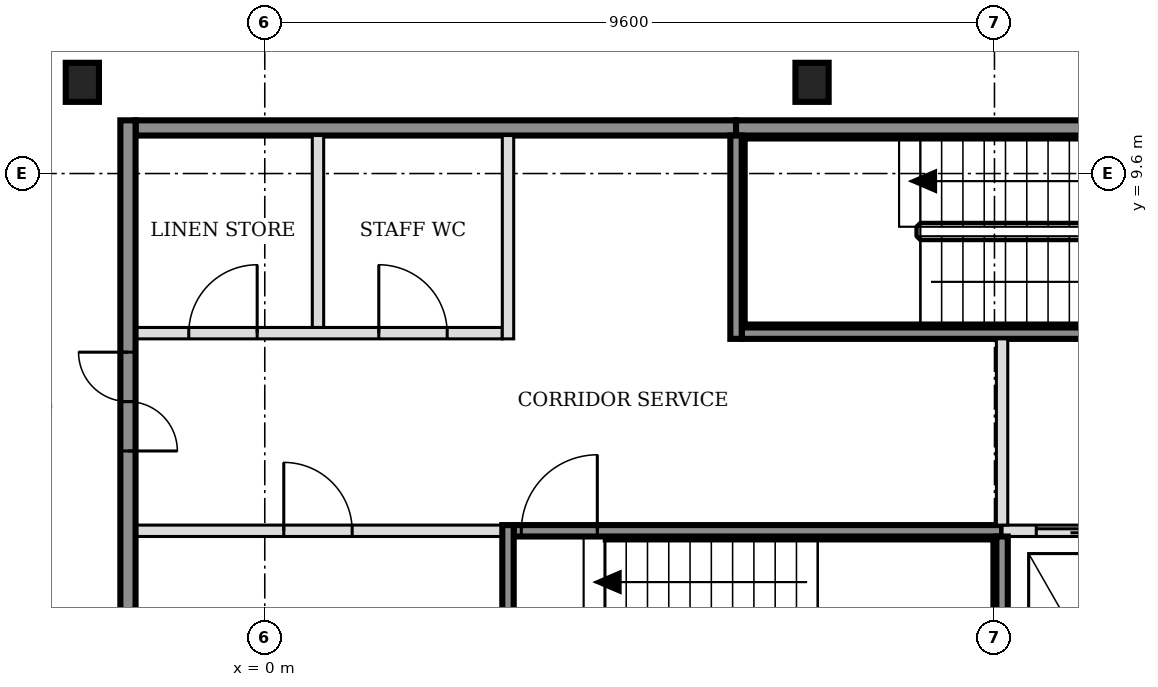
"""IFC4 building model, lengths in metres.
Left out: names, types, materials, properties, quantities, classifications, styles, units other than length and angle.
Written with IfcOpenShell. Run it as: python <this file> out.ifc"""

import sys

from ifc_helpers import new_model, si_unit, direction, frame, frame_2d, origin, origin_2d, place, context, subcontext, project, spatial, rectangle, i_section, extrude, element, fill, save


model = new_model("IFC4")
c1 = context("Model", 3, precision=1e-05, world=origin(), true_north=direction((0.0, 1.0)))
c2 = subcontext(c1, "Body", "Model", "MODEL_VIEW")
j1 = project(units=[si_unit("LENGTHUNIT", "METRE"), si_unit("PLANEANGLEUNIT", "RADIAN")], contexts=[c1])
p1 = place(None, origin())
s1 = spatial("IfcSite", under=j1, at=p1, CompositionType="ELEMENT")
p2 = place(p1, origin())
s2 = spatial("IfcBuilding", under=s1, at=p2, CompositionType="ELEMENT")
p3 = place(p2, frame((0.0, 0.0, 101.4)))
s3 = spatial("IfcBuildingStorey", under=s2, at=p3, CompositionType="ELEMENT", Elevation=101.4)
for number, where, z_axis, x_axis in (
    (1, (-2.4, 10.8, -0.15), (0.0, 0.0, 1.0), (1.0, 0.0, 0.0)),
    (2, (7.2, 10.8, -0.15), (0.0, 0.0, 1.0), (1.0, 0.0, 0.0)),
):
    element("IfcColumn", number, at=place(p3, frame(where, z_axis=z_axis, x_axis=x_axis)), inside=s3, PredefinedType="COLUMN", context=c2, shape_type="SweptSolid", body=[
        extrude(i_section(OverallWidth=0.437, OverallDepth=0.514, WebThickness=0.061, FlangeThickness=0.097, FilletRadius=0.015, at=origin_2d()), origin(), (0.0, 0.0, 1.0), 3.6),
    ])
p4 = place(p3, frame((-1.7, 4.9, 0.0), z_axis=(0.0, 0.0, 1.0), x_axis=(1.0, 0.0, 0.0)))
e3 = element("IfcWall", 3, at=p4, inside=s3, PredefinedType="PARTITIONING", context=c2, shape_type="SweptSolid", body=[
    extrude(rectangle(XDim=4.825, YDim=0.15, at=frame_2d((2.413, 0.0))), origin(), (0.0, 0.0, 1.0), 3.45),
])
p5 = place(p4, frame((1.95, 0.0, 0.0)))
e4 = element("IfcOpeningElement", 4, at=p5, cuts=e3, PredefinedType="OPENING", context=c2, shape_type="SweptSolid", body=[
    extrude(rectangle(XDim=0.9, YDim=2.1, at=frame_2d((0.45, 1.05))), frame((0.0, 0.085, 0.0), z_axis=(0.0, -1.0, 0.0), x_axis=(1.0, 0.0, 0.0)), (0.0, 0.0, 1.0), 0.17),
])
p6 = place(p3, frame((3.275, 4.9, 0.0), z_axis=(0.0, 0.0, 1.0), x_axis=(1.0, 0.0, 0.0)))
e5 = element("IfcWall", 5, at=p6, inside=s3, PredefinedType="SOLIDWALL", context=c2, shape_type="SweptSolid", body=[
    extrude(rectangle(XDim=6.425, YDim=0.15, at=frame_2d((3.212, 0.0))), origin(), (0.0, 0.0, 1.0), 3.45),
])
p7 = place(p6, frame((0.1, 0.0, 0.0)))
e6 = element("IfcOpeningElement", 6, at=p7, cuts=e5, PredefinedType="OPENING", context=c2, shape_type="SweptSolid", body=[
    extrude(rectangle(XDim=1.0, YDim=2.1, at=frame_2d((0.5, 1.05))), frame((0.0, 0.085, 0.0), z_axis=(0.0, -1.0, 0.0), x_axis=(1.0, 0.0, 0.0)), (0.0, 0.0, 1.0), 0.17),
])
p8 = place(p3, frame((9.7, 4.9, 0.0), z_axis=(0.0, 0.0, 1.0), x_axis=(1.0, 0.0, 0.0)))
e7 = element("IfcWall", 7, at=p8, inside=s3, PredefinedType="SOLIDWALL", context=c2, shape_type="SweptSolid", body=[
    extrude(rectangle(XDim=6.4, YDim=0.15, at=frame_2d((3.2, 0.0))), origin(), (0.0, 0.0, 1.0), 3.45),
])
p9 = place(p8, frame((0.45, 0.0, 0.0)))
e8 = element("IfcOpeningElement", 8, at=p9, cuts=e7, PredefinedType="OPENING", context=c2, shape_type="SweptSolid", body=[
    extrude(rectangle(XDim=1.0, YDim=2.1, at=frame_2d((0.5, 1.05))), frame((0.0, 0.085, 0.0), z_axis=(0.0, -1.0, 0.0), x_axis=(1.0, 0.0, 0.0)), (0.0, 0.0, 1.0), 0.17),
])
p10 = place(p8, frame((2.35, 0.0, 0.0)))
e9 = element("IfcOpeningElement", 9, at=p10, cuts=e7, PredefinedType="OPENING", context=c2, shape_type="SweptSolid", body=[
    extrude(rectangle(XDim=1.0, YDim=2.1, at=frame_2d((0.5, 1.05))), frame((0.0, 0.085, 0.0), z_axis=(0.0, -1.0, 0.0), x_axis=(1.0, 0.0, 0.0)), (0.0, 0.0, 1.0), 0.17),
])
p11 = place(p8, frame((4.7, 0.0, 0.0)))
e10 = element("IfcOpeningElement", 10, at=p11, cuts=e7, PredefinedType="OPENING", context=c2, shape_type="SweptSolid", body=[
    extrude(rectangle(XDim=0.9, YDim=2.1, at=frame_2d((0.45, 1.05))), frame((0.0, 0.085, 0.0), z_axis=(0.0, -1.0, 0.0), x_axis=(1.0, 0.0, 0.0)), (0.0, 0.0, 1.0), 0.17),
])
p12 = place(p3, frame((-1.7, 7.5, 0.0), z_axis=(0.0, 0.0, 1.0), x_axis=(1.0, 0.0, 0.0)))
e11 = element("IfcWall", 11, at=p12, inside=s3, PredefinedType="PARTITIONING", context=c2, shape_type="SweptSolid", body=[
    extrude(rectangle(XDim=4.825, YDim=0.15, at=frame_2d((2.413, 0.0))), origin(), (0.0, 0.0, 1.0), 3.45),
])
p13 = place(p12, frame((0.7, 0.0, 0.0)))
e12 = element("IfcOpeningElement", 12, at=p13, cuts=e11, PredefinedType="OPENING", context=c2, shape_type="SweptSolid", body=[
    extrude(rectangle(XDim=0.9, YDim=2.1, at=frame_2d((0.45, 1.05))), frame((0.0, 0.085, 0.0), z_axis=(0.0, -1.0, 0.0), x_axis=(1.0, 0.0, 0.0)), (0.0, 0.0, 1.0), 0.17),
])
p14 = place(p12, frame((3.2, 0.0, 0.0)))
e13 = element("IfcOpeningElement", 13, at=p14, cuts=e11, PredefinedType="OPENING", context=c2, shape_type="SweptSolid", body=[
    extrude(rectangle(XDim=0.9, YDim=2.1, at=frame_2d((0.45, 1.05))), frame((0.0, 0.085, 0.0), z_axis=(0.0, -1.0, 0.0), x_axis=(1.0, 0.0, 0.0)), (0.0, 0.0, 1.0), 0.17),
])
p15 = place(p3, frame((6.275, 7.5, 0.0), z_axis=(0.0, 0.0, 1.0), x_axis=(1.0, 0.0, 0.0)))
e14 = element("IfcWall", 14, at=p15, inside=s3, PredefinedType="SOLIDWALL", context=c2, shape_type="SweptSolid", body=[
    extrude(rectangle(XDim=6.425, YDim=0.15, at=frame_2d((3.212, 0.0))), origin(), (0.0, 0.0, 1.0), 3.45),
])
p16 = place(p15, frame((5.225, 0.0, 0.0)))
e15 = element("IfcOpeningElement", 15, at=p16, cuts=e14, PredefinedType="OPENING", context=c2, shape_type="SweptSolid", body=[
    extrude(rectangle(XDim=1.0, YDim=2.1, at=frame_2d((0.5, 1.05))), frame((0.0, 0.085, 0.0), z_axis=(0.0, -1.0, 0.0), x_axis=(1.0, 0.0, 0.0)), (0.0, 0.0, 1.0), 0.17),
])
p17 = place(p3, frame((-1.7, 10.2, 0.0), z_axis=(0.0, 0.0, 1.0), x_axis=(1.0, 0.0, 0.0)))
e16 = element("IfcWall", 16, at=p17, inside=s3, PredefinedType="SOLIDWALL", context=c2, shape_type="SweptSolid", body=[
    extrude(rectangle(XDim=7.9, YDim=0.2, at=frame_2d((3.95, 0.0))), origin(), (0.0, 0.0, 1.0), 3.45),
])
p18 = place(p3, frame((6.2, 10.2, 0.0), z_axis=(0.0, 0.0, 1.0), x_axis=(1.0, 0.0, 0.0)))
e17 = element("IfcWall", 17, at=p18, inside=s3, PredefinedType="SOLIDWALL", context=c2, shape_type="SweptSolid", body=[
    extrude(rectangle(XDim=6.5, YDim=0.2, at=frame_2d((3.25, 0.0))), origin(), (0.0, 0.0, 1.0), 3.45),
])
p19 = place(p3, frame((-1.8, -5.5, 0.0), z_axis=(0.0, 0.0, 1.0), x_axis=(0.0, 1.0, 0.0)))
e18 = element("IfcWall", 18, at=p19, inside=s3, PredefinedType="SOLIDWALL", context=c2, shape_type="SweptSolid", body=[
    extrude(rectangle(XDim=15.8, YDim=0.2, at=frame_2d((7.9, 0.0))), origin(), (0.0, 0.0, 1.0), 3.45),
])
p20 = place(p19, frame((3.05, 0.0, 0.0)))
e19 = element("IfcOpeningElement", 19, at=p20, cuts=e18, PredefinedType="OPENING", context=c2, shape_type="SweptSolid", body=[
    extrude(rectangle(XDim=1.3, YDim=2.1, at=frame_2d((0.65, 1.05))), frame((0.0, 0.11, 0.0), z_axis=(0.0, -1.0, 0.0), x_axis=(1.0, 0.0, 0.0)), (0.0, 0.0, 1.0), 0.22),
])
p21 = place(p19, frame((11.45, 0.0, 0.0)))
e20 = element("IfcOpeningElement", 20, at=p21, cuts=e18, PredefinedType="OPENING", context=c2, shape_type="SweptSolid", body=[
    extrude(rectangle(XDim=1.3, YDim=2.1, at=frame_2d((0.65, 1.05))), frame((0.0, 0.11, 0.0), z_axis=(0.0, -1.0, 0.0), x_axis=(1.0, 0.0, 0.0)), (0.0, 0.0, 1.0), 0.22),
])
p22 = place(p3, frame((0.7, 7.575, 0.0), z_axis=(0.0, 0.0, 1.0), x_axis=(0.0, 1.0, 0.0)))
e21 = element("IfcWall", 21, at=p22, inside=s3, PredefinedType="PARTITIONING", context=c2, shape_type="SweptSolid", body=[
    extrude(rectangle(XDim=2.525, YDim=0.15, at=frame_2d((1.263, 0.0))), origin(), (0.0, 0.0, 1.0), 3.45),
])
p23 = place(p3, frame((3.2, 2.275, 0.0), z_axis=(0.0, 0.0, 1.0), x_axis=(0.0, 1.0, 0.0)))
e22 = element("IfcWall", 22, at=p23, inside=s3, PredefinedType="SOLIDWALL", context=c2, shape_type="SweptSolid", body=[
    extrude(rectangle(XDim=2.7, YDim=0.15, at=frame_2d((1.35, 0.0))), origin(), (0.0, 0.0, 1.0), 3.45),
])
p24 = place(p3, frame((3.2, 7.425, 0.0), z_axis=(0.0, 0.0, 1.0), x_axis=(0.0, 1.0, 0.0)))
e23 = element("IfcWall", 23, at=p24, inside=s3, PredefinedType="PARTITIONING", context=c2, shape_type="SweptSolid", body=[
    extrude(rectangle(XDim=2.675, YDim=0.15, at=frame_2d((1.337, 0.0))), origin(), (0.0, 0.0, 1.0), 3.45),
])
p25 = place(p3, frame((6.2, 7.425, 0.0), z_axis=(0.0, 0.0, 1.0), x_axis=(0.0, 1.0, 0.0)))
e24 = element("IfcWall", 24, at=p25, inside=s3, PredefinedType="SOLIDWALL", context=c2, shape_type="SweptSolid", body=[
    extrude(rectangle(XDim=2.675, YDim=0.15, at=frame_2d((1.337, 0.0))), origin(), (0.0, 0.0, 1.0), 3.45),
])
p26 = place(p3, frame((9.7, 2.275, 0.0), z_axis=(0.0, 0.0, 1.0), x_axis=(0.0, 1.0, 0.0)))
e25 = element("IfcWall", 25, at=p26, inside=s3, PredefinedType="SOLIDWALL", context=c2, shape_type="SweptSolid", body=[
    extrude(rectangle(XDim=2.55, YDim=0.15, at=frame_2d((1.275, 0.0))), origin(), (0.0, 0.0, 1.0), 3.45),
])
p27 = place(p3, frame((9.7, 4.975, 0.0), z_axis=(0.0, 0.0, 1.0), x_axis=(0.0, 1.0, 0.0)))
e26 = element("IfcWall", 26, at=p27, inside=s3, PredefinedType="SOLIDWALL", context=c2, shape_type="SweptSolid", body=[
    extrude(rectangle(XDim=2.45, YDim=0.15, at=frame_2d((1.225, 0.0))), origin(), (0.0, 0.0, 1.0), 3.45),
])
p28 = place(p9, origin())
e27 = element("IfcDoor", 27, at=p28, inside=s3, OperationType="DOUBLE_DOOR_SLIDING", PredefinedType="DOOR", context=c2, shape_type="SweptSolid", body=[
    extrude(rectangle(XDim=1.0, YDim=2.1, at=frame_2d((0.5, 1.05))), frame((0.0, 0.025, 0.0), z_axis=(0.0, -1.0, 0.0), x_axis=(1.0, 0.0, 0.0)), (0.0, 0.0, 1.0), 0.05),
])
fill(e8, e27)
p29 = place(p7, origin())
e28 = element("IfcDoor", 28, at=p29, inside=s3, OperationType="SINGLE_SWING_RIGHT", PredefinedType="DOOR", context=c2, shape_type="SweptSolid", body=[
    extrude(rectangle(XDim=1.0, YDim=2.1, at=frame_2d((0.5, 1.05))), frame((0.0, 0.025, 0.0), z_axis=(0.0, -1.0, 0.0), x_axis=(1.0, 0.0, 0.0)), (0.0, 0.0, 1.0), 0.05),
])
fill(e6, e28)
p30 = place(p21, origin())
e29 = element("IfcDoor", 29, at=p30, inside=s3, OperationType="DOUBLE_DOOR_SINGLE_SWING", PredefinedType="DOOR", context=c2, shape_type="SweptSolid", body=[
    extrude(rectangle(XDim=1.3, YDim=2.1, at=frame_2d((0.65, 1.05))), frame((0.0, 0.025, 0.0), z_axis=(0.0, -1.0, 0.0), x_axis=(1.0, 0.0, 0.0)), (0.0, 0.0, 1.0), 0.05),
])
fill(e20, e29)
p31 = place(p5, origin())
e30 = element("IfcDoor", 30, at=p31, inside=s3, OperationType="SINGLE_SWING_LEFT", PredefinedType="DOOR", context=c2, shape_type="SweptSolid", body=[
    extrude(rectangle(XDim=0.9, YDim=2.1, at=frame_2d((0.45, 1.05))), frame((0.0, 0.025, 0.0), z_axis=(0.0, -1.0, 0.0), x_axis=(1.0, 0.0, 0.0)), (0.0, 0.0, 1.0), 0.05),
])
fill(e4, e30)
p32 = place(p13, origin())
e31 = element("IfcDoor", 31, at=p32, inside=s3, OperationType="SINGLE_SWING_RIGHT", PredefinedType="DOOR", context=c2, shape_type="SweptSolid", body=[
    extrude(rectangle(XDim=0.9, YDim=2.1, at=frame_2d((0.45, 1.05))), frame((0.0, 0.025, 0.0), z_axis=(0.0, -1.0, 0.0), x_axis=(1.0, 0.0, 0.0)), (0.0, 0.0, 1.0), 0.05),
])
fill(e12, e31)
p33 = place(p14, origin())
e32 = element("IfcDoor", 32, at=p33, inside=s3, OperationType="SINGLE_SWING_LEFT", PredefinedType="DOOR", context=c2, shape_type="SweptSolid", body=[
    extrude(rectangle(XDim=0.9, YDim=2.1, at=frame_2d((0.45, 1.05))), frame((0.0, 0.025, 0.0), z_axis=(0.0, -1.0, 0.0), x_axis=(1.0, 0.0, 0.0)), (0.0, 0.0, 1.0), 0.05),
])
fill(e13, e32)
save(model, sys.argv[1])
